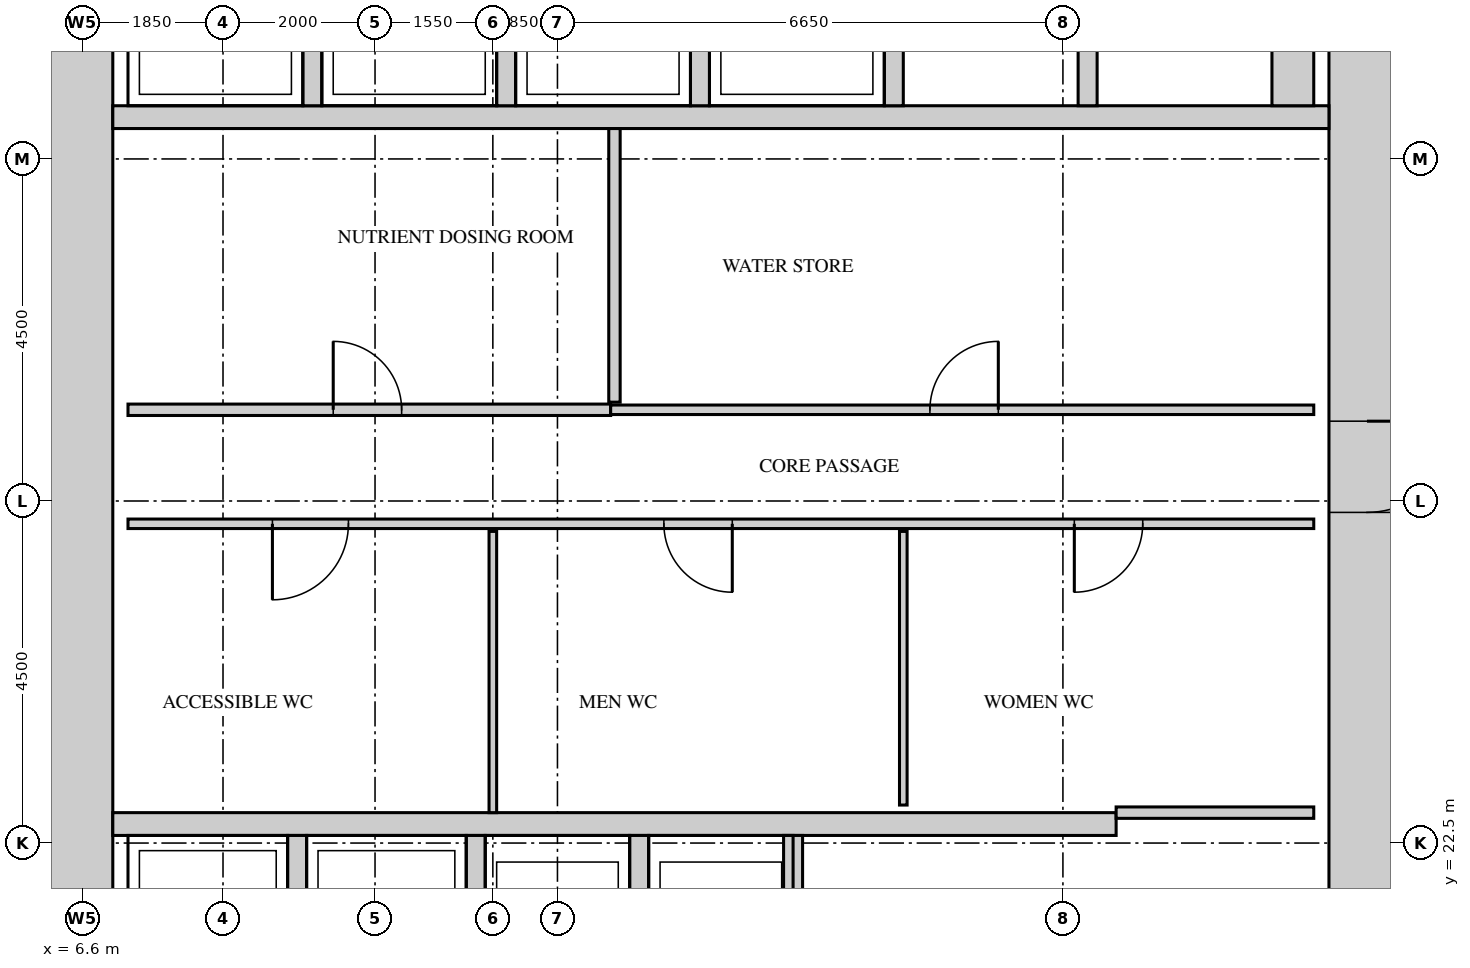
"""IFC4 building model, lengths in metres.
Left out: names, types, materials, properties, quantities, classifications, styles, units other than length and angle.
Written with IfcOpenShell. Run it as: python <this file> out.ifc"""

import sys

from ifc_helpers import new_model, si_unit, direction, frame, frame_2d, origin, place, context, subcontext, project, spatial, rectangle, extrude, source, transform, mapped, element, fill, save


model = new_model("IFC4")
c1 = context("Model", 3, precision=1e-05, world=origin(), true_north=direction((0.0, 1.0)))
c2 = subcontext(c1, "Body", "Model", "MODEL_VIEW")
j1 = project(units=[si_unit("LENGTHUNIT", "METRE"), si_unit("PLANEANGLEUNIT", "RADIAN")], contexts=[c1])
p1 = place(None, origin())
s1 = spatial("IfcSite", under=j1, at=p1, CompositionType="ELEMENT")
p2 = place(p1, origin())
s2 = spatial("IfcBuilding", under=s1, at=p2, CompositionType="ELEMENT")
p3 = place(p2, frame((0.0, 0.0, 105.9)))
s3 = spatial("IfcBuildingStorey", under=s2, at=p3, CompositionType="ELEMENT", Elevation=105.9)
m1 = source(origin(), c2, "Body", "SweptSolid", [
    extrude(rectangle(XDim=28.0, YDim=1.0, at=frame_2d((14.0, 0.0))), origin(), (0.0, 0.0, 1.0), 4.1),
])
p4 = place(p3, frame((23.5, 13.0, 0.0), z_axis=(0.0, 0.0, 1.0), x_axis=(0.0, 1.0, 0.0)))
e1 = element("IfcWall", 1, at=p4, inside=s3, PredefinedType="SHEAR", context=c2, shape_type="MappedRepresentation", body=[
    mapped(m1, transform((0.0, 0.0, 0.0))),
])
m2 = source(origin(), c2, "Body", "SweptSolid", [
    extrude(rectangle(XDim=1.8, YDim=2.1, at=frame_2d((0.9, 1.05))), frame((0.0, 0.51, 0.0), z_axis=(0.0, -1.0, 0.0), x_axis=(1.0, 0.0, 0.0)), (0.0, 0.0, 1.0), 1.02),
])
p5 = place(p4, frame((22.6, 0.0, 0.0)))
e2 = element("IfcOpeningElement", 2, at=p5, cuts=e1, PredefinedType="OPENING", context=c2, shape_type="MappedRepresentation", body=[
    mapped(m2, transform((0.0, 0.0, 0.0))),
])
m3 = source(origin(), c2, "Body", "SweptSolid", [
    extrude(rectangle(XDim=1.2, YDim=2.1, at=frame_2d((0.6, 1.05))), frame((0.0, 0.51, 0.0), z_axis=(0.0, -1.0, 0.0), x_axis=(1.0, 0.0, 0.0)), (0.0, 0.0, 1.0), 1.02),
])
p6 = place(p4, frame((13.85, 0.0, 0.0)))
e3 = element("IfcOpeningElement", 3, at=p6, cuts=e1, PredefinedType="OPENING", context=c2, shape_type="MappedRepresentation", body=[
    mapped(m3, transform((0.0, 0.0, 0.0))),
])
m4 = source(origin(), c2, "Body", "SweptSolid", [
    extrude(rectangle(XDim=0.9, YDim=2.1, at=frame_2d((0.45, 1.05))), frame((0.0, 0.51, 0.0), z_axis=(0.0, -1.0, 0.0), x_axis=(1.0, 0.0, 0.0)), (0.0, 0.0, 1.0), 1.02),
])
p7 = place(p4, frame((1.0, 0.0, 0.0)))
e4 = element("IfcOpeningElement", 4, at=p7, cuts=e1, PredefinedType="OPENING", context=c2, shape_type="MappedRepresentation", body=[
    mapped(m4, transform((0.0, 0.0, 0.0))),
])
p8 = place(p4, frame((4.0, 0.0, 0.0)))
e5 = element("IfcOpeningElement", 5, at=p8, cuts=e1, PredefinedType="OPENING", context=c2, shape_type="MappedRepresentation", body=[
    mapped(m4, transform((0.0, 0.0, 0.0))),
])
p9 = place(p4, frame((7.6, 0.0, 0.0)))
e6 = element("IfcOpeningElement", 6, at=p9, cuts=e1, PredefinedType="OPENING", context=c2, shape_type="MappedRepresentation", body=[
    mapped(m4, transform((0.0, 0.0, 0.0))),
])
p10 = place(p3, frame((6.5, 13.0, 0.0), z_axis=(0.0, 0.0, 1.0), x_axis=(0.0, 1.0, 0.0)))
e7 = element("IfcWall", 7, at=p10, inside=s3, PredefinedType="SHEAR", context=c2, shape_type="MappedRepresentation", body=[
    mapped(m1, transform((0.0, 0.0, 0.0))),
])
m5 = source(origin(), c2, "Body", "SweptSolid", [
    extrude(rectangle(XDim=13.2, YDim=0.3, at=frame_2d((6.6, 0.0))), origin(), (0.0, 0.0, 1.0), 4.1),
])
p11 = place(p3, frame((7.0, 22.75, 0.0), z_axis=(0.0, 0.0, 1.0), x_axis=(1.0, 0.0, 0.0)))
e8 = element("IfcWall", 8, at=p11, inside=s3, PredefinedType="STANDARD", context=c2, shape_type="MappedRepresentation", body=[
    mapped(m5, transform((0.0, 0.0, 0.0))),
])
m6 = source(origin(), c2, "Body", "SweptSolid", [
    extrude(rectangle(XDim=16.0, YDim=0.3, at=frame_2d((8.0, 0.0))), origin(), (0.0, 0.0, 1.0), 4.1),
])
p12 = place(p3, frame((7.0, 32.05, 0.0), z_axis=(0.0, 0.0, 1.0), x_axis=(1.0, 0.0, 0.0)))
e9 = element("IfcWall", 9, at=p12, inside=s3, PredefinedType="STANDARD", context=c2, shape_type="MappedRepresentation", body=[
    mapped(m6, transform((0.0, 0.0, 0.0))),
])
m7 = source(origin(), c2, "Body", "SweptSolid", [
    extrude(rectangle(XDim=3.1, YDim=0.25, at=frame_2d((1.55, 0.0))), origin(), (0.0, 0.0, 1.0), 4.1),
])
for number, where, z_axis, x_axis in (
    (10, (9.425, 19.5, 0.0), (0.0, 0.0, 1.0), (0.0, 1.0, 0.0)),
    (11, (11.775, 19.5, 0.0), (0.0, 0.0, 1.0), (0.0, 1.0, 0.0)),
    (12, (13.925, 19.5, 0.0), (0.0, 0.0, 1.0), (0.0, 1.0, 0.0)),
    (13, (15.95, 19.5, 0.0), (0.0, 0.0, 1.0), (0.0, 1.0, 0.0)),
):
    element("IfcWall", number, at=place(p3, frame(where, z_axis=z_axis, x_axis=x_axis)), inside=s3, PredefinedType="STANDARD", context=c2, shape_type="MappedRepresentation", body=[
        mapped(m7, transform((0.0, 0.0, 0.0))),
    ])
m8 = source(origin(), c2, "Body", "SweptSolid", [
    extrude(rectangle(XDim=2.4, YDim=0.25, at=frame_2d((1.2, 0.0))), origin(), (0.0, 0.0, 1.0), 4.1),
])
for number, where, z_axis, x_axis in (
    (14, (9.625, 32.2, 0.0), (0.0, 0.0, 1.0), (0.0, 1.0, 0.0)),
    (15, (12.175, 32.2, 0.0), (0.0, 0.0, 1.0), (0.0, 1.0, 0.0)),
    (16, (14.725, 32.2, 0.0), (0.0, 0.0, 1.0), (0.0, 1.0, 0.0)),
    (17, (17.275, 32.2, 0.0), (0.0, 0.0, 1.0), (0.0, 1.0, 0.0)),
    (18, (19.825, 32.2, 0.0), (0.0, 0.0, 1.0), (0.0, 1.0, 0.0)),
):
    element("IfcWall", number, at=place(p3, frame(where, z_axis=z_axis, x_axis=x_axis)), inside=s3, PredefinedType="STANDARD", context=c2, shape_type="MappedRepresentation", body=[
        mapped(m8, transform((0.0, 0.0, 0.0))),
    ])
m9 = source(origin(), c2, "Body", "SweptSolid", [
    extrude(rectangle(XDim=2.4, YDim=0.55, at=frame_2d((1.2, 0.0))), origin(), (0.0, 0.0, 1.0), 4.1),
])
p13 = place(p3, frame((22.525, 32.2, 0.0), z_axis=(0.0, 0.0, 1.0), x_axis=(0.0, 1.0, 0.0)))
e19 = element("IfcWall", 19, at=p13, inside=s3, PredefinedType="STANDARD", context=c2, shape_type="MappedRepresentation", body=[
    mapped(m9, transform((0.0, 0.0, 0.0))),
])
m10 = source(origin(), c2, "Body", "SweptSolid", [
    extrude(rectangle(XDim=3.7, YDim=0.1, at=frame_2d((1.85, 0.0))), origin(), (0.0, 0.0, 1.0), 4.2),
])
p14 = place(p3, frame((12.0, 22.9, 0.0), z_axis=(0.0, 0.0, 1.0), x_axis=(0.0, 1.0, 0.0)))
e20 = element("IfcWall", 20, at=p14, inside=s3, PredefinedType="PARTITIONING", context=c2, shape_type="MappedRepresentation", body=[
    mapped(m10, transform((0.0, 0.0, 0.0))),
])
m11 = source(origin(), c2, "Body", "SweptSolid", [
    extrude(rectangle(XDim=2.6, YDim=0.15, at=frame_2d((1.3, 0.0))), origin(), (0.0, 0.0, 1.0), 4.2),
])
p15 = place(p3, frame((20.2, 22.9, 0.0), z_axis=(0.0, 0.0, 1.0), x_axis=(1.0, 0.0, 0.0)))
e21 = element("IfcWall", 21, at=p15, inside=s3, PredefinedType="PARTITIONING", context=c2, shape_type="MappedRepresentation", body=[
    mapped(m11, transform((0.0, 0.0, 0.0))),
])
m12 = source(origin(), c2, "Body", "SweptSolid", [
    extrude(rectangle(XDim=3.6, YDim=0.1, at=frame_2d((1.8, 0.0))), origin(), (0.0, 0.0, 1.0), 4.2),
])
p16 = place(p3, frame((17.4, 23.0, 0.0), z_axis=(0.0, 0.0, 1.0), x_axis=(0.0, 1.0, 0.0)))
e22 = element("IfcWall", 22, at=p16, inside=s3, PredefinedType="PARTITIONING", context=c2, shape_type="MappedRepresentation", body=[
    mapped(m12, transform((0.0, 0.0, 0.0))),
])
m13 = source(origin(), c2, "Body", "SweptSolid", [
    extrude(rectangle(XDim=15.6, YDim=0.125, at=frame_2d((7.8, 0.0))), origin(), (0.0, 0.0, 1.0), 4.2),
])
p17 = place(p3, frame((7.2, 26.7, 0.0), z_axis=(0.0, 0.0, 1.0), x_axis=(1.0, 0.0, 0.0)))
e23 = element("IfcWall", 23, at=p17, inside=s3, PredefinedType="PARTITIONING", context=c2, shape_type="MappedRepresentation", body=[
    mapped(m13, transform((0.0, 0.0, 0.0))),
])
m14 = source(origin(), c2, "Body", "SweptSolid", [
    extrude(rectangle(XDim=1.0, YDim=2.1, at=frame_2d((0.5, 1.05))), frame((0.0, 0.073, 0.0), z_axis=(0.0, -1.0, 0.0), x_axis=(1.0, 0.0, 0.0)), (0.0, 0.0, 1.0), 0.145),
])
p18 = place(p17, frame((1.9, 0.0, 0.0)))
e24 = element("IfcOpeningElement", 24, at=p18, cuts=e23, PredefinedType="OPENING", context=c2, shape_type="MappedRepresentation", body=[
    mapped(m14, transform((0.0, 0.0, 0.0))),
])
m15 = source(origin(), c2, "Body", "SweptSolid", [
    extrude(rectangle(XDim=0.9, YDim=2.1, at=frame_2d((0.45, 1.05))), frame((0.0, 0.073, 0.0), z_axis=(0.0, -1.0, 0.0), x_axis=(1.0, 0.0, 0.0)), (0.0, 0.0, 1.0), 0.145),
])
p19 = place(p17, frame((7.05, 0.0, 0.0)))
e25 = element("IfcOpeningElement", 25, at=p19, cuts=e23, PredefinedType="OPENING", context=c2, shape_type="MappedRepresentation", body=[
    mapped(m15, transform((0.0, 0.0, 0.0))),
])
p20 = place(p17, frame((12.45, 0.0, 0.0)))
e26 = element("IfcOpeningElement", 26, at=p20, cuts=e23, PredefinedType="OPENING", context=c2, shape_type="MappedRepresentation", body=[
    mapped(m15, transform((0.0, 0.0, 0.0))),
])
m16 = source(origin(), c2, "Body", "SweptSolid", [
    extrude(rectangle(XDim=6.35, YDim=0.15, at=frame_2d((3.175, 0.0))), origin(), (0.0, 0.0, 1.0), 4.2),
])
p21 = place(p3, frame((7.2, 28.2, 0.0), z_axis=(0.0, 0.0, 1.0), x_axis=(1.0, 0.0, 0.0)))
e27 = element("IfcWall", 27, at=p21, inside=s3, PredefinedType="PARTITIONING", context=c2, shape_type="MappedRepresentation", body=[
    mapped(m16, transform((0.0, 0.0, 0.0))),
])
m17 = source(origin(), c2, "Body", "SweptSolid", [
    extrude(rectangle(XDim=0.9, YDim=2.1, at=frame_2d((0.45, 1.05))), frame((0.0, 0.085, 0.0), z_axis=(0.0, -1.0, 0.0), x_axis=(1.0, 0.0, 0.0)), (0.0, 0.0, 1.0), 0.17),
])
p22 = place(p21, frame((2.7, 0.0, 0.0)))
e28 = element("IfcOpeningElement", 28, at=p22, cuts=e27, PredefinedType="OPENING", context=c2, shape_type="MappedRepresentation", body=[
    mapped(m17, transform((0.0, 0.0, 0.0))),
])
m18 = source(origin(), c2, "Body", "SweptSolid", [
    extrude(rectangle(XDim=9.25, YDim=0.125, at=frame_2d((4.625, 0.0))), origin(), (0.0, 0.0, 1.0), 4.2),
])
p23 = place(p3, frame((13.55, 28.2, 0.0), z_axis=(0.0, 0.0, 1.0), x_axis=(1.0, 0.0, 0.0)))
e29 = element("IfcWall", 29, at=p23, inside=s3, PredefinedType="PARTITIONING", context=c2, shape_type="MappedRepresentation", body=[
    mapped(m18, transform((0.0, 0.0, 0.0))),
])
p24 = place(p23, frame((4.2, 0.0, 0.0)))
e30 = element("IfcOpeningElement", 30, at=p24, cuts=e29, PredefinedType="OPENING", context=c2, shape_type="MappedRepresentation", body=[
    mapped(m15, transform((0.0, 0.0, 0.0))),
])
m19 = source(origin(), c2, "Body", "SweptSolid", [
    extrude(rectangle(XDim=3.6, YDim=0.15, at=frame_2d((1.8, 0.0))), origin(), (0.0, 0.0, 1.0), 4.2),
])
p25 = place(p3, frame((13.6, 28.3, 0.0), z_axis=(0.0, 0.0, 1.0), x_axis=(0.0, 1.0, 0.0)))
e31 = element("IfcWall", 31, at=p25, inside=s3, PredefinedType="PARTITIONING", context=c2, shape_type="MappedRepresentation", body=[
    mapped(m19, transform((0.0, 0.0, 0.0))),
])
m20 = source(origin(), c2, "Body", "SweptSolid", [
    extrude(rectangle(XDim=1.2, YDim=2.1, at=frame_2d((0.6, 1.05))), frame((0.0, 0.45, 0.0), z_axis=(0.0, -1.0, 0.0), x_axis=(1.0, 0.0, 0.0)), (0.0, 0.0, 1.0), 0.9),
])
p26 = place(p6, origin())
e32 = element("IfcDoor", 32, at=p26, inside=s3, OperationType="SINGLE_SWING_RIGHT", PredefinedType="DOOR", context=c2, shape_type="MappedRepresentation", body=[
    mapped(m20, transform((0.0, 0.0, 0.0))),
])
fill(e3, e32)
m21 = source(origin(), c2, "Body", "SweptSolid", [
    extrude(rectangle(XDim=0.9, YDim=2.1, at=frame_2d((0.45, 1.05))), frame((0.0, 0.025, 0.0), z_axis=(0.0, -1.0, 0.0), x_axis=(1.0, 0.0, 0.0)), (0.0, 0.0, 1.0), 0.05),
])
p27 = place(p22, origin())
e33 = element("IfcDoor", 33, at=p27, inside=s3, OperationType="SINGLE_SWING_RIGHT", PredefinedType="DOOR", context=c2, shape_type="MappedRepresentation", body=[
    mapped(m21, transform((0.0, 0.0, 0.0))),
])
fill(e28, e33)
p28 = place(p24, origin())
e34 = element("IfcDoor", 34, at=p28, inside=s3, OperationType="SINGLE_SWING_LEFT", PredefinedType="DOOR", context=c2, shape_type="MappedRepresentation", body=[
    mapped(m21, transform((0.0, 0.0, 0.0))),
])
fill(e30, e34)
m22 = source(origin(), c2, "Body", "SweptSolid", [
    extrude(rectangle(XDim=1.0, YDim=2.1, at=frame_2d((0.5, 1.05))), frame((0.0, 0.025, 0.0), z_axis=(0.0, -1.0, 0.0), x_axis=(1.0, 0.0, 0.0)), (0.0, 0.0, 1.0), 0.05),
])
p29 = place(p18, origin())
e35 = element("IfcDoor", 35, at=p29, inside=s3, OperationType="SINGLE_SWING_LEFT", PredefinedType="DOOR", context=c2, shape_type="MappedRepresentation", body=[
    mapped(m22, transform((0.0, 0.0, 0.0))),
])
fill(e24, e35)
p30 = place(p19, origin())
e36 = element("IfcDoor", 36, at=p30, inside=s3, OperationType="SINGLE_SWING_RIGHT", PredefinedType="DOOR", context=c2, shape_type="MappedRepresentation", body=[
    mapped(m21, transform((0.0, 0.0, 0.0))),
])
fill(e25, e36)
p31 = place(p20, origin())
e37 = element("IfcDoor", 37, at=p31, inside=s3, OperationType="SINGLE_SWING_LEFT", PredefinedType="DOOR", context=c2, shape_type="MappedRepresentation", body=[
    mapped(m21, transform((0.0, 0.0, 0.0))),
])
fill(e26, e37)
save(model, sys.argv[1])
